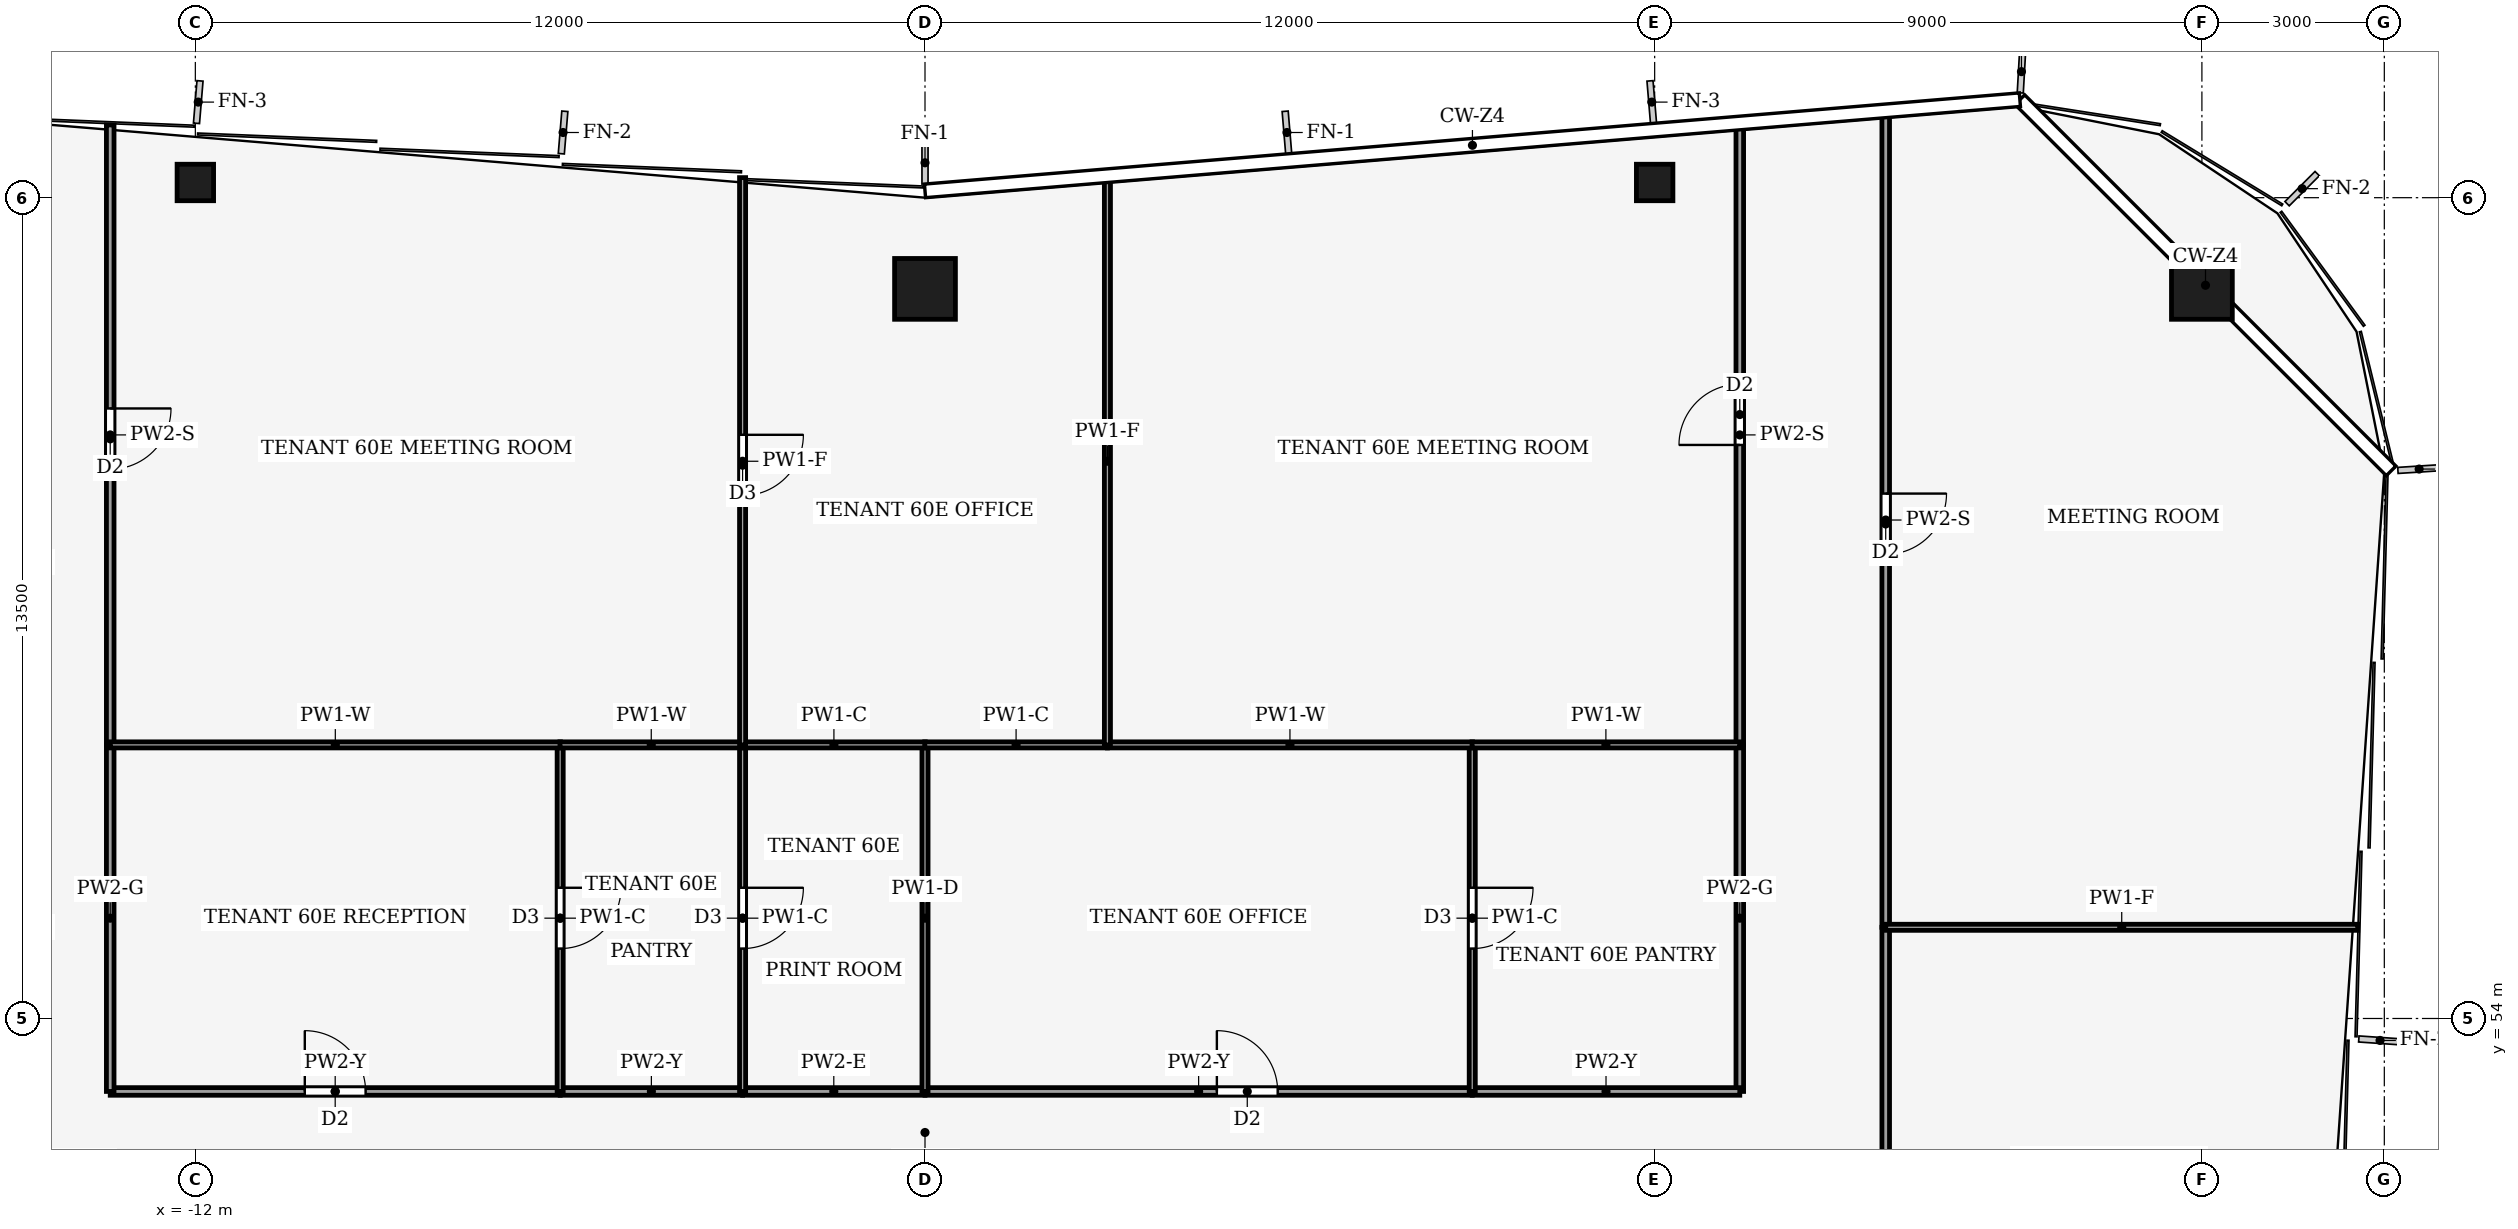
"""IFC4 building model, lengths in metres.
Left out: names, types, materials, properties, quantities, classifications, styles, units other than length and angle.
Written with IfcOpenShell. Run it as: python <this file> out.ifc"""

import sys

from ifc_helpers import new_model, si_unit, direction, frame, frame_2d, origin, origin_2d, place, context, subcontext, project, spatial, rectangle, hollow_rectangle, extrude, element, fill, save


model = new_model("IFC4")
c1 = context("Model", 3, precision=1e-05, world=origin(), true_north=direction((0.0, 1.0)))
c2 = subcontext(c1, "Body", "Model", "MODEL_VIEW")
j1 = project(units=[si_unit("LENGTHUNIT", "METRE"), si_unit("PLANEANGLEUNIT", "RADIAN")], contexts=[c1])
p1 = place(None, origin())
s1 = spatial("IfcSite", under=j1, at=p1, CompositionType="ELEMENT")
p2 = place(p1, origin())
s2 = spatial("IfcBuilding", under=s1, at=p2, CompositionType="ELEMENT")
p3 = place(p2, frame((0.0, 0.0, 262.0)))
s3 = spatial("IfcBuildingStorey", under=s2, at=p3, CompositionType="ELEMENT", Elevation=262.0)
for number, where, z_axis, x_axis in (
    (1, (0.0, 66.0, 0.0), (0.0, 0.0, 1.0), (1.0, 0.0, 0.0)),
    (2, (21.0, 66.0, 0.0), (0.0, 0.0, 1.0), (1.0, 0.0, 0.0)),
):
    element("IfcColumn", number, at=place(p3, frame(where, z_axis=z_axis, x_axis=x_axis)), inside=s3, PredefinedType="COLUMN", context=c2, shape_type="SweptSolid", body=[
        extrude(hollow_rectangle(XDim=1.0, YDim=1.0, WallThickness=0.045, at=origin_2d()), origin(), (0.0, 0.0, 1.0), 4.0),
    ])
for number, where, z_axis, x_axis in (
    (3, (-12.0, 67.75, 0.0), (0.0, 0.0, 1.0), (1.0, 0.0, 0.0)),
    (4, (12.0, 67.75, 0.0), (0.0, 0.0, 1.0), (1.0, 0.0, 0.0)),
):
    element("IfcColumn", number, at=place(p3, frame(where, z_axis=z_axis, x_axis=x_axis)), inside=s3, PredefinedType="COLUMN", context=c2, shape_type="SweptSolid", body=[
        extrude(hollow_rectangle(XDim=0.6, YDim=0.6, WallThickness=0.025, at=origin_2d()), origin(), (0.0, 0.0, 1.0), 4.0),
    ])
p4 = place(p3, frame((15.8, 55.5, 0.0), z_axis=(0.0, 0.0, 1.0), x_axis=(0.0, -1.0, 0.0)))
e5 = element("IfcWall", 5, at=p4, inside=s3, PredefinedType="PARTITIONING", context=c2, shape_type="SweptSolid", body=[
    extrude(rectangle(XDim=9.0, YDim=0.125, at=frame_2d((4.5, 0.0))), origin(), (0.0, 0.0, 1.0), 3.24),
])
p5 = place(p4, frame((4.0, 0.0, 0.0)))
e6 = element("IfcOpeningElement", 6, at=p5, cuts=e5, PredefinedType="OPENING", context=c2, shape_type="SweptSolid", body=[
    extrude(rectangle(XDim=1.0, YDim=2.1, at=frame_2d((0.5, 1.05))), frame((0.0, 0.073, 0.0), z_axis=(0.0, -1.0, 0.0), x_axis=(1.0, 0.0, 0.0)), (0.0, 0.0, 1.0), 0.145),
])
p6 = place(p3, frame((15.8, 68.897, 0.0), z_axis=(0.0, 0.0, 1.0), x_axis=(0.0, -1.0, 0.0)))
e7 = element("IfcWall", 7, at=p6, inside=s3, PredefinedType="PARTITIONING", context=c2, shape_type="SweptSolid", body=[
    extrude(rectangle(XDim=13.397, YDim=0.125, at=frame_2d((6.698, 0.0))), origin(), (0.0, 0.0, 1.0), 3.04),
])
p7 = place(p6, frame((6.263, 0.0, 0.0)))
e8 = element("IfcOpeningElement", 8, at=p7, cuts=e7, PredefinedType="OPENING", context=c2, shape_type="SweptSolid", body=[
    extrude(rectangle(XDim=1.0, YDim=2.1, at=frame_2d((0.5, 1.05))), frame((0.0, 0.073, 0.0), z_axis=(0.0, -1.0, 0.0), x_axis=(1.0, 0.0, 0.0)), (0.0, 0.0, 1.0), 0.145),
])
p8 = place(p3, frame((-13.4, 52.8, 0.0), z_axis=(0.0, 0.0, 1.0), x_axis=(1.0, 0.0, 0.0)))
e9 = element("IfcWall", 9, at=p8, inside=s3, PredefinedType="PARTITIONING", context=c2, shape_type="SweptSolid", body=[
    extrude(rectangle(XDim=7.4, YDim=0.125, at=frame_2d((3.7, 0.0))), origin(), (0.0, 0.0, 1.0), 3.24),
])
p9 = place(p8, frame((3.2, 0.0, 0.0)))
e10 = element("IfcOpeningElement", 10, at=p9, cuts=e9, PredefinedType="OPENING", context=c2, shape_type="SweptSolid", body=[
    extrude(rectangle(XDim=1.0, YDim=2.1, at=frame_2d((0.5, 1.05))), frame((0.0, 0.073, 0.0), z_axis=(0.0, -1.0, 0.0), x_axis=(1.0, 0.0, 0.0)), (0.0, 0.0, 1.0), 0.145),
])
p10 = place(p3, frame((-13.4, 52.8, 0.0), z_axis=(0.0, 0.0, 1.0), x_axis=(0.0, 1.0, 0.0)))
e11 = element("IfcWall", 11, at=p10, inside=s3, PredefinedType="PARTITIONING", context=c2, shape_type="SweptSolid", body=[
    extrude(rectangle(XDim=5.7, YDim=0.125, at=frame_2d((2.85, 0.0))), origin(), (0.0, 0.0, 1.0), 3.87),
])
p11 = place(p3, frame((-3.0, 52.8, 0.0), z_axis=(0.0, 0.0, 1.0), x_axis=(-1.0, 0.0, 0.0)))
e12 = element("IfcWall", 12, at=p11, inside=s3, PredefinedType="PARTITIONING", context=c2, shape_type="SweptSolid", body=[
    extrude(rectangle(XDim=3.0, YDim=0.125, at=frame_2d((1.5, 0.0))), origin(), (0.0, 0.0, 1.0), 3.24),
])
p12 = place(p3, frame((0.0, 52.8, 0.0), z_axis=(0.0, 0.0, 1.0), x_axis=(-1.0, 0.0, 0.0)))
e13 = element("IfcWall", 13, at=p12, inside=s3, PredefinedType="PARTITIONING", context=c2, shape_type="SweptSolid", body=[
    extrude(rectangle(XDim=3.0, YDim=0.125, at=frame_2d((1.5, 0.0))), origin(), (0.0, 0.0, 1.0), 3.29),
])
p13 = place(p3, frame((0.0, 52.8, 0.0), z_axis=(0.0, 0.0, 1.0), x_axis=(1.0, 0.0, 0.0)))
e14 = element("IfcWall", 14, at=p13, inside=s3, PredefinedType="PARTITIONING", context=c2, shape_type="SweptSolid", body=[
    extrude(rectangle(XDim=9.0, YDim=0.125, at=frame_2d((4.5, 0.0))), origin(), (0.0, 0.0, 1.0), 3.24),
])
p14 = place(p13, frame((4.8, 0.0, 0.0)))
e15 = element("IfcOpeningElement", 15, at=p14, cuts=e14, PredefinedType="OPENING", context=c2, shape_type="SweptSolid", body=[
    extrude(rectangle(XDim=1.0, YDim=2.1, at=frame_2d((0.5, 1.05))), frame((0.0, 0.073, 0.0), z_axis=(0.0, -1.0, 0.0), x_axis=(1.0, 0.0, 0.0)), (0.0, 0.0, 1.0), 0.145),
])
p15 = place(p3, frame((13.4, 52.8, 0.0), z_axis=(0.0, 0.0, 1.0), x_axis=(0.0, 1.0, 0.0)))
e16 = element("IfcWall", 16, at=p15, inside=s3, PredefinedType="PARTITIONING", context=c2, shape_type="SweptSolid", body=[
    extrude(rectangle(XDim=5.7, YDim=0.125, at=frame_2d((2.85, 0.0))), origin(), (0.0, 0.0, 1.0), 3.87),
])
p16 = place(p3, frame((13.4, 52.8, 0.0), z_axis=(0.0, 0.0, 1.0), x_axis=(-1.0, 0.0, 0.0)))
e17 = element("IfcWall", 17, at=p16, inside=s3, PredefinedType="PARTITIONING", context=c2, shape_type="SweptSolid", body=[
    extrude(rectangle(XDim=4.4, YDim=0.125, at=frame_2d((2.2, 0.0))), origin(), (0.0, 0.0, 1.0), 3.24),
])
p17 = place(p3, frame((-13.4, 68.697, 0.0), z_axis=(0.0, 0.0, 1.0), x_axis=(0.0, -1.0, 0.0)))
e18 = element("IfcWall", 18, at=p17, inside=s3, PredefinedType="PARTITIONING", context=c2, shape_type="SweptSolid", body=[
    extrude(rectangle(XDim=10.197, YDim=0.125, at=frame_2d((5.098, 0.0))), origin(), (0.0, 0.0, 1.0), 3.04),
])
p18 = place(p17, frame((4.663, 0.0, 0.0)))
e19 = element("IfcOpeningElement", 19, at=p18, cuts=e18, PredefinedType="OPENING", context=c2, shape_type="SweptSolid", body=[
    extrude(rectangle(XDim=1.0, YDim=2.1, at=frame_2d((0.5, 1.05))), frame((0.0, 0.073, 0.0), z_axis=(0.0, -1.0, 0.0), x_axis=(1.0, 0.0, 0.0)), (0.0, 0.0, 1.0), 0.145),
])
p19 = place(p3, frame((13.4, 58.5, 0.0), z_axis=(0.0, 0.0, 1.0), x_axis=(0.0, 1.0, 0.0)))
e20 = element("IfcWall", 20, at=p19, inside=s3, PredefinedType="PARTITIONING", context=c2, shape_type="SweptSolid", body=[
    extrude(rectangle(XDim=10.197, YDim=0.125, at=frame_2d((5.098, 0.0))), origin(), (0.0, 0.0, 1.0), 3.04),
])
p20 = place(p19, frame((4.933, 0.0, 0.0)))
e21 = element("IfcOpeningElement", 21, at=p20, cuts=e20, PredefinedType="OPENING", context=c2, shape_type="SweptSolid", body=[
    extrude(rectangle(XDim=1.0, YDim=2.1, at=frame_2d((0.5, 1.05))), frame((0.0, 0.073, 0.0), z_axis=(0.0, -1.0, 0.0), x_axis=(1.0, 0.0, 0.0)), (0.0, 0.0, 1.0), 0.145),
])
p21 = place(p3, frame((23.563, 55.5, 0.0), z_axis=(0.0, 0.0, 1.0), x_axis=(-1.0, 0.0, 0.0)))
e22 = element("IfcWall", 22, at=p21, inside=s3, PredefinedType="PARTITIONING", context=c2, shape_type="SweptSolid", body=[
    extrude(rectangle(XDim=7.763, YDim=0.1, at=frame_2d((3.881, 0.0))), origin(), (0.0, 0.0, 1.0), 3.04),
])
p22 = place(p3, frame((-6.0, 58.5, 0.0), z_axis=(0.0, 0.0, 1.0), x_axis=(0.0, -1.0, 0.0)))
e23 = element("IfcWall", 23, at=p22, inside=s3, PredefinedType="PARTITIONING", context=c2, shape_type="SweptSolid", body=[
    extrude(rectangle(XDim=5.7, YDim=0.1, at=frame_2d((2.85, 0.0))), origin(), (0.0, 0.0, 1.0), 3.87),
])
p23 = place(p22, frame((2.35, 0.0, 0.0)))
e24 = element("IfcOpeningElement", 24, at=p23, cuts=e23, PredefinedType="OPENING", context=c2, shape_type="SweptSolid", body=[
    extrude(rectangle(XDim=1.0, YDim=2.1, at=frame_2d((0.5, 1.05))), frame((0.0, 0.06, 0.0), z_axis=(0.0, -1.0, 0.0), x_axis=(1.0, 0.0, 0.0)), (0.0, 0.0, 1.0), 0.12),
])
p24 = place(p3, frame((-5.996, 58.5, 0.0), z_axis=(0.0, 0.0, 1.0), x_axis=(-1.0, 0.0, 0.0)))
e25 = element("IfcWall", 25, at=p24, inside=s3, PredefinedType="PARTITIONING", context=c2, shape_type="SweptSolid", body=[
    extrude(rectangle(XDim=7.404, YDim=0.1, at=frame_2d((3.702, 0.0))), origin(), (0.0, 0.0, 1.0), 3.24),
])
p25 = place(p3, frame((-3.0, 58.5, 0.0), z_axis=(0.0, 0.0, 1.0), x_axis=(0.0, -1.0, 0.0)))
e26 = element("IfcWall", 26, at=p25, inside=s3, PredefinedType="PARTITIONING", context=c2, shape_type="SweptSolid", body=[
    extrude(rectangle(XDim=5.7, YDim=0.1, at=frame_2d((2.85, 0.0))), origin(), (0.0, 0.0, 1.0), 3.87),
])
p26 = place(p25, frame((2.35, 0.0, 0.0)))
e27 = element("IfcOpeningElement", 27, at=p26, cuts=e26, PredefinedType="OPENING", context=c2, shape_type="SweptSolid", body=[
    extrude(rectangle(XDim=1.0, YDim=2.1, at=frame_2d((0.5, 1.05))), frame((0.0, 0.06, 0.0), z_axis=(0.0, -1.0, 0.0), x_axis=(1.0, 0.0, 0.0)), (0.0, 0.0, 1.0), 0.12),
])
p27 = place(p3, frame((-3.0, 58.5, 0.0), z_axis=(0.0, 0.0, 1.0), x_axis=(-1.0, 0.0, 0.0)))
e28 = element("IfcWall", 28, at=p27, inside=s3, PredefinedType="PARTITIONING", context=c2, shape_type="SweptSolid", body=[
    extrude(rectangle(XDim=3.004, YDim=0.1, at=frame_2d((1.502, 0.0))), origin(), (0.0, 0.0, 1.0), 3.24),
])
p28 = place(p3, frame((0.0, 52.8, 0.0), z_axis=(0.0, 0.0, 1.0), x_axis=(0.0, 1.0, 0.0)))
e29 = element("IfcWall", 29, at=p28, inside=s3, PredefinedType="PARTITIONING", context=c2, shape_type="SweptSolid", body=[
    extrude(rectangle(XDim=5.7, YDim=0.1, at=frame_2d((2.85, 0.0))), origin(), (0.0, 0.0, 1.0), 3.29),
])
p29 = place(p3, frame((0.004, 58.5, 0.0), z_axis=(0.0, 0.0, 1.0), x_axis=(-1.0, 0.0, 0.0)))
e30 = element("IfcWall", 30, at=p29, inside=s3, PredefinedType="PARTITIONING", context=c2, shape_type="SweptSolid", body=[
    extrude(rectangle(XDim=3.004, YDim=0.1, at=frame_2d((1.502, 0.0))), origin(), (0.0, 0.0, 1.0), 3.87),
])
p30 = place(p3, frame((9.0, 58.5, 0.0), z_axis=(0.0, 0.0, 1.0), x_axis=(0.0, -1.0, 0.0)))
e31 = element("IfcWall", 31, at=p30, inside=s3, PredefinedType="PARTITIONING", context=c2, shape_type="SweptSolid", body=[
    extrude(rectangle(XDim=5.7, YDim=0.1, at=frame_2d((2.85, 0.0))), origin(), (0.0, 0.0, 1.0), 3.87),
])
p31 = place(p30, frame((2.35, 0.0, 0.0)))
e32 = element("IfcOpeningElement", 32, at=p31, cuts=e31, PredefinedType="OPENING", context=c2, shape_type="SweptSolid", body=[
    extrude(rectangle(XDim=1.0, YDim=2.1, at=frame_2d((0.5, 1.05))), frame((0.0, 0.06, 0.0), z_axis=(0.0, -1.0, 0.0), x_axis=(1.0, 0.0, 0.0)), (0.0, 0.0, 1.0), 0.12),
])
p32 = place(p3, frame((3.0, 58.5, 0.0), z_axis=(0.0, 0.0, 1.0), x_axis=(-1.0, 0.0, 0.0)))
e33 = element("IfcWall", 33, at=p32, inside=s3, PredefinedType="PARTITIONING", context=c2, shape_type="SweptSolid", body=[
    extrude(rectangle(XDim=3.004, YDim=0.1, at=frame_2d((1.502, 0.0))), origin(), (0.0, 0.0, 1.0), 3.87),
])
p33 = place(p3, frame((9.004, 58.5, 0.0), z_axis=(0.0, 0.0, 1.0), x_axis=(-1.0, 0.0, 0.0)))
e34 = element("IfcWall", 34, at=p33, inside=s3, PredefinedType="PARTITIONING", context=c2, shape_type="SweptSolid", body=[
    extrude(rectangle(XDim=6.004, YDim=0.1, at=frame_2d((3.002, 0.0))), origin(), (0.0, 0.0, 1.0), 3.24),
])
p34 = place(p3, frame((13.4, 58.5, 0.0), z_axis=(0.0, 0.0, 1.0), x_axis=(-1.0, 0.0, 0.0)))
e35 = element("IfcWall", 35, at=p34, inside=s3, PredefinedType="PARTITIONING", context=c2, shape_type="SweptSolid", body=[
    extrude(rectangle(XDim=4.404, YDim=0.1, at=frame_2d((2.202, 0.0))), origin(), (0.0, 0.0, 1.0), 3.24),
])
p35 = place(p3, frame((-3.0, 67.83, 0.0), z_axis=(0.0, 0.0, 1.0), x_axis=(0.0, -1.0, 0.0)))
e36 = element("IfcWall", 36, at=p35, inside=s3, PredefinedType="PARTITIONING", context=c2, shape_type="SweptSolid", body=[
    extrude(rectangle(XDim=9.33, YDim=0.1, at=frame_2d((4.665, 0.0))), origin(), (0.0, 0.0, 1.0), 3.04),
])
p36 = place(p35, frame((4.23, 0.0, 0.0)))
e37 = element("IfcOpeningElement", 37, at=p36, cuts=e36, PredefinedType="OPENING", context=c2, shape_type="SweptSolid", body=[
    extrude(rectangle(XDim=1.0, YDim=2.1, at=frame_2d((0.5, 1.05))), frame((0.0, 0.06, 0.0), z_axis=(0.0, -1.0, 0.0), x_axis=(1.0, 0.0, 0.0)), (0.0, 0.0, 1.0), 0.12),
])
p37 = place(p3, frame((3.0, 58.5, 0.0), z_axis=(0.0, 0.0, 1.0), x_axis=(0.0, 1.0, 0.0)))
e38 = element("IfcWall", 38, at=p37, inside=s3, PredefinedType="PARTITIONING", context=c2, shape_type="SweptSolid", body=[
    extrude(rectangle(XDim=9.33, YDim=0.1, at=frame_2d((4.665, 0.0))), origin(), (0.0, 0.0, 1.0), 3.04),
])
p38 = place(p7, origin())
e39 = element("IfcDoor", 39, at=p38, inside=s3, OperationType="SINGLE_SWING_RIGHT", PredefinedType="DOOR", context=c2, shape_type="SweptSolid", body=[
    extrude(rectangle(XDim=1.0, YDim=2.1, at=frame_2d((0.5, 1.05))), frame((0.0, 0.025, 0.0), z_axis=(0.0, -1.0, 0.0), x_axis=(1.0, 0.0, 0.0)), (0.0, 0.0, 1.0), 0.05),
])
fill(e8, e39)
p39 = place(p9, origin())
e40 = element("IfcDoor", 40, at=p39, inside=s3, OperationType="SINGLE_SWING_LEFT", PredefinedType="DOOR", context=c2, shape_type="SweptSolid", body=[
    extrude(rectangle(XDim=1.0, YDim=2.1, at=frame_2d((0.5, 1.05))), frame((0.0, 0.025, 0.0), z_axis=(0.0, -1.0, 0.0), x_axis=(1.0, 0.0, 0.0)), (0.0, 0.0, 1.0), 0.05),
])
fill(e10, e40)
p40 = place(p14, origin())
e41 = element("IfcDoor", 41, at=p40, inside=s3, OperationType="SINGLE_SWING_RIGHT", PredefinedType="DOOR", context=c2, shape_type="SweptSolid", body=[
    extrude(rectangle(XDim=1.0, YDim=2.1, at=frame_2d((0.5, 1.05))), frame((0.0, 0.025, 0.0), z_axis=(0.0, -1.0, 0.0), x_axis=(1.0, 0.0, 0.0)), (0.0, 0.0, 1.0), 0.05),
])
fill(e15, e41)
p41 = place(p18, origin())
e42 = element("IfcDoor", 42, at=p41, inside=s3, OperationType="SINGLE_SWING_RIGHT", PredefinedType="DOOR", context=c2, shape_type="SweptSolid", body=[
    extrude(rectangle(XDim=1.0, YDim=2.1, at=frame_2d((0.5, 1.05))), frame((0.0, 0.025, 0.0), z_axis=(0.0, -1.0, 0.0), x_axis=(1.0, 0.0, 0.0)), (0.0, 0.0, 1.0), 0.05),
])
fill(e19, e42)
p42 = place(p20, origin())
e43 = element("IfcDoor", 43, at=p42, inside=s3, OperationType="SINGLE_SWING_RIGHT", PredefinedType="DOOR", context=c2, shape_type="SweptSolid", body=[
    extrude(rectangle(XDim=1.0, YDim=2.1, at=frame_2d((0.5, 1.05))), frame((0.0, 0.025, 0.0), z_axis=(0.0, -1.0, 0.0), x_axis=(1.0, 0.0, 0.0)), (0.0, 0.0, 1.0), 0.05),
])
fill(e21, e43)
p43 = place(p23, origin())
e44 = element("IfcDoor", 44, at=p43, inside=s3, OperationType="SINGLE_SWING_RIGHT", PredefinedType="DOOR", context=c2, shape_type="SweptSolid", body=[
    extrude(rectangle(XDim=1.0, YDim=2.1, at=frame_2d((0.5, 1.05))), frame((0.0, 0.025, 0.0), z_axis=(0.0, -1.0, 0.0), x_axis=(1.0, 0.0, 0.0)), (0.0, 0.0, 1.0), 0.05),
])
fill(e24, e44)
p44 = place(p26, origin())
e45 = element("IfcDoor", 45, at=p44, inside=s3, OperationType="SINGLE_SWING_LEFT", PredefinedType="DOOR", context=c2, shape_type="SweptSolid", body=[
    extrude(rectangle(XDim=1.0, YDim=2.1, at=frame_2d((0.5, 1.05))), frame((0.0, 0.025, 0.0), z_axis=(0.0, -1.0, 0.0), x_axis=(1.0, 0.0, 0.0)), (0.0, 0.0, 1.0), 0.05),
])
fill(e27, e45)
p45 = place(p31, origin())
e46 = element("IfcDoor", 46, at=p45, inside=s3, OperationType="SINGLE_SWING_RIGHT", PredefinedType="DOOR", context=c2, shape_type="SweptSolid", body=[
    extrude(rectangle(XDim=1.0, YDim=2.1, at=frame_2d((0.5, 1.05))), frame((0.0, 0.025, 0.0), z_axis=(0.0, -1.0, 0.0), x_axis=(1.0, 0.0, 0.0)), (0.0, 0.0, 1.0), 0.05),
])
fill(e32, e46)
p46 = place(p36, origin())
e47 = element("IfcDoor", 47, at=p46, inside=s3, OperationType="SINGLE_SWING_RIGHT", PredefinedType="DOOR", context=c2, shape_type="SweptSolid", body=[
    extrude(rectangle(XDim=1.0, YDim=2.1, at=frame_2d((0.5, 1.05))), frame((0.0, 0.025, 0.0), z_axis=(0.0, -1.0, 0.0), x_axis=(1.0, 0.0, 0.0)), (0.0, 0.0, 1.0), 0.05),
])
fill(e37, e47)
save(model, sys.argv[1])
